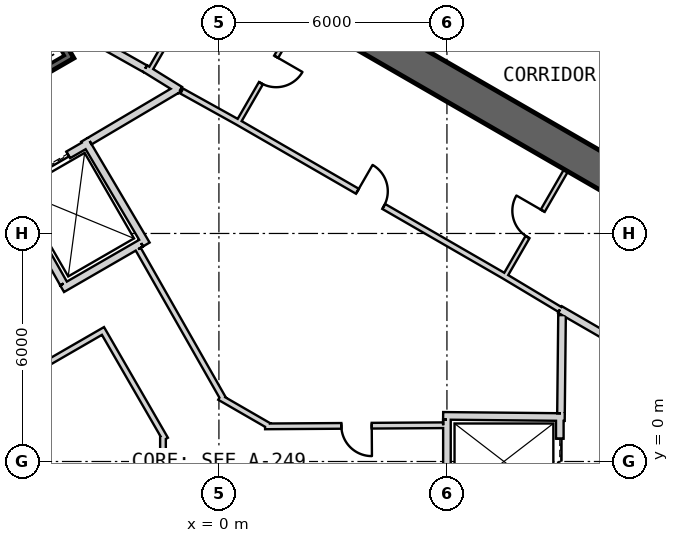
"""IFC4 building model, lengths in metres.
Left out: names, types, materials, properties, quantities, classifications, styles, units other than length and angle.
Written with IfcOpenShell. Run it as: python <this file> out.ifc"""

import sys

from ifc_helpers import new_model, si_unit, direction, frame, frame_2d, origin, place, context, subcontext, project, spatial, rectangle, extrude, element, fill, save


model = new_model("IFC4")
c1 = context("Model", 3, precision=1e-05, world=origin(), true_north=direction((0.0, 1.0)))
c2 = subcontext(c1, "Body", "Model", "MODEL_VIEW")
j1 = project(units=[si_unit("LENGTHUNIT", "METRE"), si_unit("PLANEANGLEUNIT", "RADIAN")], contexts=[c1])
p1 = place(None, origin())
s1 = spatial("IfcSite", under=j1, at=p1, CompositionType="ELEMENT")
p2 = place(p1, origin())
s2 = spatial("IfcBuilding", under=s1, at=p2, CompositionType="ELEMENT")
p3 = place(p2, frame((0.0, 0.0, 404.8)))
s3 = spatial("IfcBuildingStorey", under=s2, at=p3, CompositionType="ELEMENT", Elevation=404.8)
p4 = place(p3, frame((19.475, 2.208, 0.0), z_axis=(0.0, 0.0, 1.0), x_axis=(-0.866028369851, 0.499994862586, 0.0)))
e1 = element("IfcWall", 1, at=p4, inside=s3, PredefinedType="SHEAR", context=c2, shape_type="SweptSolid", body=[
    extrude(rectangle(XDim=31.523, YDim=0.9, at=frame_2d((15.762, 0.0))), origin(), (0.0, 0.0, 1.0), 5.5),
])
p5 = place(p4, frame((3.612, 0.0, 0.0)))
e2 = element("IfcOpeningElement", 2, at=p5, cuts=e1, PredefinedType="OPENING", context=c2, shape_type="SweptSolid", body=[
    extrude(rectangle(XDim=1.2, YDim=2.4, at=frame_2d((0.6, 1.2))), frame((0.0, 0.46, 0.0), z_axis=(0.0, -1.0, 0.0), x_axis=(1.0, 0.0, 0.0)), (0.0, 0.0, 1.0), 0.92),
])
p6 = place(p4, frame((26.712, 0.0, 0.0)))
e3 = element("IfcOpeningElement", 3, at=p6, cuts=e1, PredefinedType="OPENING", context=c2, shape_type="SweptSolid", body=[
    extrude(rectangle(XDim=1.2, YDim=2.4, at=frame_2d((0.6, 1.2))), frame((0.0, 0.46, 0.0), z_axis=(0.0, -1.0, 0.0), x_axis=(1.0, 0.0, 0.0)), (0.0, 0.0, 1.0), 0.92),
])
p7 = place(p3, frame((8.97, 1.2, 0.0), z_axis=(0.0, 0.0, 1.0), x_axis=(0.0, -1.0, 0.0)))
e4 = element("IfcWall", 4, at=p7, inside=s3, PredefinedType="PLUMBINGWALL", context=c2, shape_type="SweptSolid", body=[
    extrude(rectangle(XDim=2.4, YDim=0.2, at=frame_2d((1.2, 0.0))), origin(), (0.0, 0.0, 1.0), 5.25),
])
p8 = place(p7, frame((0.6, 0.0, 0.0)))
e5 = element("IfcOpeningElement", 5, at=p8, cuts=e4, PredefinedType="OPENING", context=c2, shape_type="SweptSolid", body=[
    extrude(rectangle(XDim=1.2, YDim=2.4, at=frame_2d((0.6, 1.2))), frame((0.0, 0.11, 0.0), z_axis=(0.0, -1.0, 0.0), x_axis=(1.0, 0.0, 0.0)), (0.0, 0.0, 1.0), 0.22),
])
p9 = place(p3, frame((6.0, -1.1, 0.0), z_axis=(0.0, 0.0, 1.0), x_axis=(0.0, 1.0, 0.0)))
e6 = element("IfcWall", 6, at=p9, inside=s3, PredefinedType="PLUMBINGWALL", context=c2, shape_type="SweptSolid", body=[
    extrude(rectangle(XDim=2.2, YDim=0.2, at=frame_2d((1.1, 0.0))), origin(), (0.0, 0.0, 1.0), 5.25),
])
p10 = place(p3, frame((5.9, 1.201, 0.0), z_axis=(0.0, 0.0, 1.0), x_axis=(0.999950064753, -0.009993397809, 0.0)))
e7 = element("IfcWall", 7, at=p10, inside=s3, PredefinedType="PLUMBINGWALL", context=c2, shape_type="SweptSolid", body=[
    extrude(rectangle(XDim=3.2, YDim=0.2, at=frame_2d((1.6, 0.0))), origin(), (0.0, 0.0, 1.0), 5.25),
])
p11 = place(p3, frame((-7.854, 17.405, -0.3), z_axis=(0.0, 0.0, 1.0), x_axis=(0.499997992926, -0.866026562566, 0.0)))
e8 = element("IfcWall", 8, at=p11, inside=s3, PredefinedType="SHEAR", context=c2, shape_type="SweptSolid", body=[
    extrude(rectangle(XDim=7.9, YDim=0.2, at=frame_2d((3.95, 0.0))), origin(), (0.0, 0.0, 1.0), 5.55),
])
p12 = place(p3, frame((-7.159, 8.8, -0.3), z_axis=(0.0, 0.0, 1.0), x_axis=(0.866047807691, 0.499961193289, 0.0)))
e9 = element("IfcWall", 9, at=p12, inside=s3, PredefinedType="SHEAR", context=c2, shape_type="SweptSolid", body=[
    extrude(rectangle(XDim=3.6, YDim=0.2, at=frame_2d((1.8, 0.0))), origin(), (0.0, 0.0, 1.0), 5.55),
])
p13 = place(p12, frame((1.25, 0.0, 0.3)))
e10 = element("IfcOpeningElement", 10, at=p13, cuts=e9, PredefinedType="OPENING", context=c2, shape_type="SweptSolid", body=[
    extrude(rectangle(XDim=1.1, YDim=2.1, at=frame_2d((0.55, 1.05))), frame((0.0, 0.11, 0.0), z_axis=(0.0, -1.0, 0.0), x_axis=(1.0, 0.0, 0.0)), (0.0, 0.0, 1.0), 0.22),
])
p14 = place(p3, frame((-5.524, 7.168, 0.0), z_axis=(0.0, 0.0, 1.0), x_axis=(0.866024647952, 0.500001309137, 0.0)))
e11 = element("IfcWall", 11, at=p14, inside=s3, PredefinedType="PLUMBINGWALL", context=c2, shape_type="SweptSolid", body=[
    extrude(rectangle(XDim=2.4, YDim=0.2, at=frame_2d((1.2, 0.0))), origin(), (0.0, 0.0, 1.0), 5.25),
])
p15 = place(p14, frame((0.6, 0.0, 0.0)))
e12 = element("IfcOpeningElement", 12, at=p15, cuts=e11, PredefinedType="OPENING", context=c2, shape_type="SweptSolid", body=[
    extrude(rectangle(XDim=1.2, YDim=2.4, at=frame_2d((0.6, 1.2))), frame((0.0, 0.11, 0.0), z_axis=(0.0, -1.0, 0.0), x_axis=(1.0, 0.0, 0.0)), (0.0, 0.0, 1.0), 0.22),
])
p16 = place(p3, frame((-3.538, 8.465, 0.0), z_axis=(0.0, 0.0, 1.0), x_axis=(0.508616218331, -0.860993346345, 0.0)))
e13 = element("IfcWall", 13, at=p16, inside=s3, PredefinedType="PLUMBINGWALL", context=c2, shape_type="SweptSolid", body=[
    extrude(rectangle(XDim=3.2, YDim=0.2, at=frame_2d((1.6, 0.0))), origin(), (0.0, 0.0, 1.0), 5.25),
])
p17 = place(p3, frame((-2.047, 5.746, 0.0), z_axis=(0.0, 0.0, 1.0), x_axis=(-0.866024647952, -0.500001309137, 0.0)))
e14 = element("IfcWall", 14, at=p17, inside=s3, PredefinedType="PLUMBINGWALL", context=c2, shape_type="SweptSolid", body=[
    extrude(rectangle(XDim=2.4, YDim=0.2, at=frame_2d((1.2, 0.0))), origin(), (0.0, 0.0, 1.0), 5.25),
])
p18 = place(p3, frame((-5.562, 7.296, 0.0), z_axis=(0.0, 0.0, 1.0), x_axis=(0.49134651263, -0.870964180966, 0.0)))
e15 = element("IfcWall", 15, at=p18, inside=s3, PredefinedType="PLUMBINGWALL", context=c2, shape_type="SweptSolid", body=[
    extrude(rectangle(XDim=3.0, YDim=0.2, at=frame_2d((1.5, 0.0))), origin(), (0.0, 0.0, 1.0), 5.25),
])
p19 = place(p3, frame((7.508, 4.845, 0.0), z_axis=(0.0, 0.0, 1.0), x_axis=(0.500017246033, 0.866015446554, 0.0)))
e16 = element("IfcWall", 16, at=p19, inside=s3, PredefinedType="PARTITIONING", context=c2, shape_type="SweptSolid", body=[
    extrude(rectangle(XDim=3.25, YDim=0.12, at=frame_2d((1.625, 0.0))), origin(), (0.0, 0.0, 1.0), 5.25),
])
p20 = place(p19, frame((1.225, 0.0, 0.0)))
e17 = element("IfcOpeningElement", 17, at=p20, cuts=e16, PredefinedType="OPENING", context=c2, shape_type="SweptSolid", body=[
    extrude(rectangle(XDim=0.8, YDim=2.1, at=frame_2d((0.4, 1.05))), frame((0.0, 0.07, 0.0), z_axis=(0.0, -1.0, 0.0), x_axis=(1.0, 0.0, 0.0)), (0.0, 0.0, 1.0), 0.14),
])
p21 = place(p3, frame((8.974, 3.999, 0.0), z_axis=(0.0, 0.0, 1.0), x_axis=(0.86601284211, -0.500021756827, 0.0)))
e18 = element("IfcWall", 18, at=p21, inside=s3, PredefinedType="PARTITIONING", context=c2, shape_type="SweptSolid", body=[
    extrude(rectangle(XDim=3.577, YDim=0.2, at=frame_2d((1.789, 0.0))), origin(), (0.0, 0.0, 1.0), 5.25),
])
p22 = place(p21, frame((1.389, 0.0, 0.0)))
e19 = element("IfcOpeningElement", 19, at=p22, cuts=e18, PredefinedType="OPENING", context=c2, shape_type="SweptSolid", body=[
    extrude(rectangle(XDim=0.8, YDim=2.1, at=frame_2d((0.4, 1.05))), frame((0.0, 0.11, 0.0), z_axis=(0.0, -1.0, 0.0), x_axis=(1.0, 0.0, 0.0)), (0.0, 0.0, 1.0), 0.22),
])
p23 = place(p3, frame((8.975, 4.0, 0.0), z_axis=(0.0, 0.0, 1.0), x_axis=(-0.857530436795, 0.514433231791, 0.0)))
e20 = element("IfcWall", 20, at=p23, inside=s3, PredefinedType="PLUMBINGWALL", context=c2, shape_type="SweptSolid", body=[
    extrude(rectangle(XDim=1.723, YDim=0.15, at=frame_2d((0.861, 0.0))), origin(), (0.0, 0.0, 1.0), 5.25),
])
p24 = place(p3, frame((2.119, 11.709, 0.0), z_axis=(0.0, 0.0, 1.0), x_axis=(-0.500017246033, -0.866015446554, 0.0)))
e21 = element("IfcWall", 21, at=p24, inside=s3, PredefinedType="PARTITIONING", context=c2, shape_type="SweptSolid", body=[
    extrude(rectangle(XDim=3.25, YDim=0.12, at=frame_2d((1.625, 0.0))), origin(), (0.0, 0.0, 1.0), 5.25),
])
p25 = place(p24, frame((1.225, 0.0, 0.0)))
e22 = element("IfcOpeningElement", 22, at=p25, cuts=e21, PredefinedType="OPENING", context=c2, shape_type="SweptSolid", body=[
    extrude(rectangle(XDim=0.8, YDim=2.1, at=frame_2d((0.4, 1.05))), frame((0.0, 0.07, 0.0), z_axis=(0.0, -1.0, 0.0), x_axis=(1.0, 0.0, 0.0)), (0.0, 0.0, 1.0), 0.14),
])
p26 = place(p3, frame((7.497, 4.886, 0.0), z_axis=(0.0, 0.0, 1.0), x_axis=(-0.866030989016, 0.499990325971, 0.0)))
e23 = element("IfcWall", 23, at=p26, inside=s3, PredefinedType="PLUMBINGWALL", context=c2, shape_type="SweptSolid", body=[
    extrude(rectangle(XDim=8.1, YDim=0.15, at=frame_2d((4.05, 0.0))), origin(), (0.0, 0.0, 1.0), 5.25),
])
p27 = place(p26, frame((3.65, 0.0, 0.0)))
e24 = element("IfcOpeningElement", 24, at=p27, cuts=e23, PredefinedType="OPENING", context=c2, shape_type="SweptSolid", body=[
    extrude(rectangle(XDim=0.8, YDim=2.1, at=frame_2d((0.4, 1.05))), frame((0.0, 0.085, 0.0), z_axis=(0.0, -1.0, 0.0), x_axis=(1.0, 0.0, 0.0)), (0.0, 0.0, 1.0), 0.17),
])
p28 = place(p3, frame((-0.22, 13.06, 0.0), z_axis=(0.0, 0.0, 1.0), x_axis=(-0.499984717929, -0.866034226713, 0.0)))
e25 = element("IfcWall", 25, at=p28, inside=s3, PredefinedType="PARTITIONING", context=c2, shape_type="SweptSolid", body=[
    extrude(rectangle(XDim=3.25, YDim=0.12, at=frame_2d((1.625, 0.0))), origin(), (0.0, 0.0, 1.0), 5.25),
])
p29 = place(p28, frame((1.225, 0.0, 0.0)))
e26 = element("IfcOpeningElement", 26, at=p29, cuts=e25, PredefinedType="OPENING", context=c2, shape_type="SweptSolid", body=[
    extrude(rectangle(XDim=0.8, YDim=2.1, at=frame_2d((0.4, 1.05))), frame((0.0, 0.07, 0.0), z_axis=(0.0, -1.0, 0.0), x_axis=(1.0, 0.0, 0.0)), (0.0, 0.0, 1.0), 0.14),
])
p30 = place(p3, frame((-1.941, 10.339, 0.0), z_axis=(0.0, 0.0, 1.0), x_axis=(0.850216889117, -0.526432561171, 0.0)))
e27 = element("IfcWall", 27, at=p30, inside=s3, PredefinedType="PARTITIONING", context=c2, shape_type="SweptSolid", body=[
    extrude(rectangle(XDim=1.078, YDim=0.2, at=frame_2d((0.539, 0.0))), origin(), (0.0, 0.0, 1.0), 5.25),
])
p31 = place(p3, frame((0.483, 8.936, 0.0), z_axis=(0.0, 0.0, 1.0), x_axis=(-0.874315691004, 0.485357674776, 0.0)))
e28 = element("IfcWall", 28, at=p31, inside=s3, PredefinedType="PLUMBINGWALL", context=c2, shape_type="SweptSolid", body=[
    extrude(rectangle(XDim=1.671, YDim=0.15, at=frame_2d((0.836, 0.0))), origin(), (0.0, 0.0, 1.0), 5.25),
])
p32 = place(p3, frame((-4.296, 11.659, 0.0), z_axis=(0.0, 0.0, 1.0), x_axis=(0.871534483978, -0.490334215854, 0.0)))
e29 = element("IfcWall", 29, at=p32, inside=s3, PredefinedType="PARTITIONING", context=c2, shape_type="SweptSolid", body=[
    extrude(rectangle(XDim=2.7, YDim=0.2, at=frame_2d((1.35, 0.0))), origin(), (0.0, 0.0, 1.0), 5.25),
])
p33 = place(p3, frame((9.001, 1.27, 0.0), z_axis=(0.0, 0.0, 1.0), x_axis=(0.010780534828, 0.999941888346, 0.0)))
e30 = element("IfcWall", 30, at=p33, inside=s3, PredefinedType="PARTITIONING", context=c2, shape_type="SweptSolid", body=[
    extrude(rectangle(XDim=2.582, YDim=0.2, at=frame_2d((1.291, 0.0))), origin(), (0.0, 0.0, 1.0), 5.25),
])
p34 = place(p3, frame((-1.056, 9.818, 0.0), z_axis=(0.0, 0.0, 1.0), x_axis=(-0.860599924646, -0.509281621207, 0.0)))
e31 = element("IfcWall", 31, at=p34, inside=s3, PredefinedType="PARTITIONING", context=c2, shape_type="SweptSolid", body=[
    extrude(rectangle(XDim=2.725, YDim=0.2, at=frame_2d((1.362, 0.0))), origin(), (0.0, 0.0, 1.0), 5.25),
])
p35 = place(p3, frame((1.214, 0.924, 0.0), z_axis=(0.0, 0.0, 1.0), x_axis=(0.999979796062, 0.006356686907, 0.0)))
e32 = element("IfcWall", 32, at=p35, inside=s3, PredefinedType="PLUMBINGWALL", context=c2, shape_type="SweptSolid", body=[
    extrude(rectangle(XDim=4.686, YDim=0.15, at=frame_2d((2.343, 0.0))), origin(), (0.0, 0.0, 1.0), 5.25),
])
p36 = place(p35, frame((2.007, 0.0, 0.0)))
e33 = element("IfcOpeningElement", 33, at=p36, cuts=e32, PredefinedType="OPENING", context=c2, shape_type="SweptSolid", body=[
    extrude(rectangle(XDim=0.8, YDim=2.1, at=frame_2d((0.4, 1.05))), frame((0.0, 0.085, 0.0), z_axis=(0.0, -1.0, 0.0), x_axis=(1.0, 0.0, 0.0)), (0.0, 0.0, 1.0), 0.17),
])
p37 = place(p3, frame((0.019, 1.689, 0.0), z_axis=(0.0, 0.0, 1.0), x_axis=(0.866047774678, -0.499961250474, 0.0)))
e34 = element("IfcWall", 34, at=p37, inside=s3, PredefinedType="PLUMBINGWALL", context=c2, shape_type="SweptSolid", body=[
    extrude(rectangle(XDim=1.504, YDim=0.15, at=frame_2d((0.752, 0.0))), origin(), (0.0, 0.0, 1.0), 5.25),
])
p38 = place(p3, frame((-2.124, 5.586, 0.0), z_axis=(0.0, 0.0, 1.0), x_axis=(0.494514430604, -0.869169418424, 0.0)))
e35 = element("IfcWall", 35, at=p38, inside=s3, PredefinedType="PLUMBINGWALL", context=c2, shape_type="SweptSolid", body=[
    extrude(rectangle(XDim=4.534, YDim=0.15, at=frame_2d((2.267, 0.0))), origin(), (0.0, 0.0, 1.0), 5.25),
])
p39 = place(p3, frame((-2.986, 3.472, 0.0), z_axis=(0.0, 0.0, 1.0), x_axis=(-0.866059624469, -0.499940723351, 0.0)))
e36 = element("IfcWall", 36, at=p39, inside=s3, PredefinedType="PLUMBINGWALL", context=c2, shape_type="SweptSolid", body=[
    extrude(rectangle(XDim=1.775, YDim=0.15, at=frame_2d((0.888, 0.0))), origin(), (0.0, 0.0, 1.0), 5.25),
])
p40 = place(p3, frame((-1.407, 0.587, 0.0), z_axis=(0.0, 0.0, 1.0), x_axis=(-0.500029427677, 0.866008413041, 0.0)))
e37 = element("IfcWall", 37, at=p40, inside=s3, PredefinedType="PLUMBINGWALL", context=c2, shape_type="SweptSolid", body=[
    extrude(rectangle(XDim=3.213, YDim=0.15, at=frame_2d((1.606, 0.0))), origin(), (0.0, 0.0, 1.0), 5.25),
])
p41 = place(p3, frame((-1.472, -0.83, 0.0), z_axis=(0.0, 0.0, 1.0), x_axis=(0.0, 1.0, 0.0)))
e38 = element("IfcWall", 38, at=p41, inside=s3, PredefinedType="PLUMBINGWALL", context=c2, shape_type="SweptSolid", body=[
    extrude(rectangle(XDim=1.507, YDim=0.15, at=frame_2d((0.753, 0.0))), origin(), (0.0, 0.0, 1.0), 5.25),
])
p42 = place(p3, frame((21.518, 4.551, 0.0), z_axis=(0.0, 0.0, 1.0), x_axis=(-0.866022813823, 0.500004485919, 0.0)))
e39 = element("IfcWall", 39, at=p42, inside=s3, PredefinedType="PARTITIONING", context=c2, shape_type="SweptSolid", body=[
    extrude(rectangle(XDim=22.655, YDim=0.12, at=frame_2d((11.327, 0.0))), origin(), (0.0, 0.0, 1.0), 5.25),
])
p43 = place(p42, frame((10.86, 0.0, 0.0)))
e40 = element("IfcOpeningElement", 40, at=p43, cuts=e39, PredefinedType="OPENING", context=c2, shape_type="SweptSolid", body=[
    extrude(rectangle(XDim=1.0, YDim=2.1, at=frame_2d((0.5, 1.05))), frame((0.0, 0.07, 0.0), z_axis=(0.0, -1.0, 0.0), x_axis=(1.0, 0.0, 0.0)), (0.0, 0.0, 1.0), 0.14),
])
p44 = place(p8, origin())
e41 = element("IfcDoor", 41, at=p44, inside=s3, OperationType="SLIDING_TO_LEFT", PredefinedType="USERDEFINED", context=c2, shape_type="SweptSolid", body=[
    extrude(rectangle(XDim=1.2, YDim=2.4, at=frame_2d((0.6, 1.2))), frame((0.0, 0.025, 0.0), z_axis=(0.0, -1.0, 0.0), x_axis=(1.0, 0.0, 0.0)), (0.0, 0.0, 1.0), 0.05),
])
fill(e5, e41)
p45 = place(p15, origin())
e42 = element("IfcDoor", 42, at=p45, inside=s3, OperationType="SLIDING_TO_LEFT", PredefinedType="USERDEFINED", context=c2, shape_type="SweptSolid", body=[
    extrude(rectangle(XDim=1.2, YDim=2.4, at=frame_2d((0.6, 1.2))), frame((0.0, 0.025, 0.0), z_axis=(0.0, -1.0, 0.0), x_axis=(1.0, 0.0, 0.0)), (0.0, 0.0, 1.0), 0.05),
])
fill(e12, e42)
p46 = place(p36, origin())
e43 = element("IfcDoor", 43, at=p46, inside=s3, OperationType="SINGLE_SWING_RIGHT", PredefinedType="USERDEFINED", context=c2, shape_type="SweptSolid", body=[
    extrude(rectangle(XDim=0.8, YDim=2.1, at=frame_2d((0.4, 1.05))), frame((0.0, 0.025, 0.0), z_axis=(0.0, -1.0, 0.0), x_axis=(1.0, 0.0, 0.0)), (0.0, 0.0, 1.0), 0.05),
])
fill(e33, e43)
p47 = place(p25, origin())
e44 = element("IfcDoor", 44, at=p47, inside=s3, OperationType="SINGLE_SWING_LEFT", PredefinedType="USERDEFINED", context=c2, shape_type="SweptSolid", body=[
    extrude(rectangle(XDim=0.8, YDim=2.1, at=frame_2d((0.4, 1.05))), frame((0.0, 0.025, 0.0), z_axis=(0.0, -1.0, 0.0), x_axis=(1.0, 0.0, 0.0)), (0.0, 0.0, 1.0), 0.05),
])
fill(e22, e44)
p48 = place(p27, origin())
e45 = element("IfcDoor", 45, at=p48, inside=s3, OperationType="SINGLE_SWING_RIGHT", PredefinedType="USERDEFINED", context=c2, shape_type="SweptSolid", body=[
    extrude(rectangle(XDim=0.8, YDim=2.1, at=frame_2d((0.4, 1.05))), frame((0.0, 0.025, 0.0), z_axis=(0.0, -1.0, 0.0), x_axis=(1.0, 0.0, 0.0)), (0.0, 0.0, 1.0), 0.05),
])
fill(e24, e45)
p49 = place(p20, origin())
e46 = element("IfcDoor", 46, at=p49, inside=s3, OperationType="SINGLE_SWING_RIGHT", PredefinedType="USERDEFINED", context=c2, shape_type="SweptSolid", body=[
    extrude(rectangle(XDim=0.8, YDim=2.1, at=frame_2d((0.4, 1.05))), frame((0.0, 0.025, 0.0), z_axis=(0.0, -1.0, 0.0), x_axis=(1.0, 0.0, 0.0)), (0.0, 0.0, 1.0), 0.05),
])
fill(e17, e46)
save(model, sys.argv[1])
